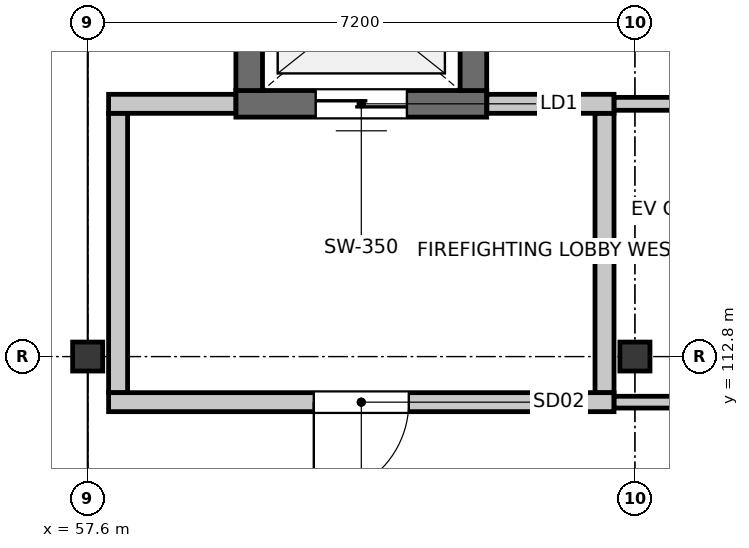
"""IFC4 building model, lengths in metres.
Left out: names, types, materials, properties, quantities, classifications, styles, units other than length and angle.
Written with IfcOpenShell. Run it as: python <this file> out.ifc"""

import sys

from ifc_helpers import new_model, si_unit, direction, frame, frame_2d, origin, origin_2d, place, context, subcontext, project, spatial, rectangle, i_section, extrude, element, fill, save


model = new_model("IFC4")
c1 = context("Model", 3, precision=1e-05, world=origin(), true_north=direction((0.0, 1.0)))
c2 = subcontext(c1, "Body", "Model", "MODEL_VIEW")
j1 = project(units=[si_unit("LENGTHUNIT", "METRE"), si_unit("PLANEANGLEUNIT", "RADIAN")], contexts=[c1])
p1 = place(None, origin())
s1 = spatial("IfcSite", under=j1, at=p1, CompositionType="ELEMENT")
p2 = place(p1, origin())
s2 = spatial("IfcBuilding", under=s1, at=p2, CompositionType="ELEMENT")
p3 = place(p2, frame((0.0, 0.0, 9.3)))
s3 = spatial("IfcBuildingStorey", under=s2, at=p3, CompositionType="ELEMENT", Elevation=9.3)
for number, where, z_axis, x_axis in (
    (1, (57.6, 112.8, 0.0), (0.0, 0.0, 1.0), (1.0, 0.0, 0.0)),
    (2, (64.8, 112.8, 0.0), (0.0, 0.0, 1.0), (1.0, 0.0, 0.0)),
):
    element("IfcColumn", number, at=place(p3, frame(where, z_axis=z_axis, x_axis=x_axis)), inside=s3, PredefinedType="COLUMN", context=c2, shape_type="SweptSolid", body=[
        extrude(i_section(OverallWidth=0.396, OverallDepth=0.381, WebThickness=0.019, FlangeThickness=0.03, FilletRadius=0.015, at=origin_2d()), origin(), (0.0, 0.0, 1.0), 3.9),
    ])
p4 = place(p3, frame((62.85, 116.125, 0.0), z_axis=(0.0, 0.0, 1.0), x_axis=(-1.0, 0.0, 0.0)))
e3 = element("IfcWall", 3, at=p4, inside=s3, PredefinedType="SHEAR", context=c2, shape_type="SweptSolid", body=[
    extrude(rectangle(XDim=3.3, YDim=0.35, at=frame_2d((1.65, 0.0))), origin(), (0.0, 0.0, 1.0), 3.69),
])
p5 = place(p4, frame((1.05, 0.0, 0.0)))
e4 = element("IfcOpeningElement", 4, at=p5, cuts=e3, PredefinedType="OPENING", context=c2, shape_type="SweptSolid", body=[
    extrude(rectangle(XDim=1.2, YDim=2.2, at=frame_2d((0.6, 1.1))), frame((0.0, 0.185, 0.0), z_axis=(0.0, -1.0, 0.0), x_axis=(1.0, 0.0, 0.0)), (0.0, 0.0, 1.0), 0.37),
])
for number, where, z_axis, x_axis in (
    (5, (59.725, 116.3, 0.0), (0.0, 0.0, 1.0), (0.0, 1.0, 0.0)),
    (6, (62.675, 118.5, 0.0), (0.0, 0.0, 1.0), (0.0, -1.0, 0.0)),
):
    element("IfcWall", number, at=place(p3, frame(where, z_axis=z_axis, x_axis=x_axis)), inside=s3, PredefinedType="SHEAR", context=c2, shape_type="SweptSolid", body=[
        extrude(rectangle(XDim=2.2, YDim=0.35, at=frame_2d((1.1, 0.0))), origin(), (0.0, 0.0, 1.0), 3.69),
    ])
p6 = place(p3, frame((64.525, 112.2, 0.0), z_axis=(0.0, 0.0, 1.0), x_axis=(-1.0, 0.0, 0.0)))
e7 = element("IfcWall", 7, at=p6, inside=s3, PredefinedType="PARTITIONING", context=c2, shape_type="SweptSolid", body=[
    extrude(rectangle(XDim=6.65, YDim=0.25, at=frame_2d((3.325, 0.0))), origin(), (0.0, 0.0, 1.0), 3.058),
])
p7 = place(p6, frame((2.7, 0.0, 0.0)))
e8 = element("IfcOpeningElement", 8, at=p7, cuts=e7, PredefinedType="OPENING", context=c2, shape_type="SweptSolid", body=[
    extrude(rectangle(XDim=1.25, YDim=2.2, at=frame_2d((0.625, 1.1))), frame((0.0, 0.135, 0.0), z_axis=(0.0, -1.0, 0.0), x_axis=(1.0, 0.0, 0.0)), (0.0, 0.0, 1.0), 0.27),
])
p8 = place(p3, frame((57.875, 116.125, 0.0), z_axis=(0.0, 0.0, 1.0), x_axis=(1.0, 0.0, 0.0)))
e9 = element("IfcWall", 9, at=p8, inside=s3, PredefinedType="PARTITIONING", context=c2, shape_type="SweptSolid", body=[
    extrude(rectangle(XDim=1.673, YDim=0.25, at=frame_2d((0.836, 0.0))), origin(), (0.0, 0.0, 1.0), 3.058),
])
p9 = place(p3, frame((62.852, 116.125, 0.0), z_axis=(0.0, 0.0, 1.0), x_axis=(1.0, 0.0, 0.0)))
e10 = element("IfcWall", 10, at=p9, inside=s3, PredefinedType="PARTITIONING", context=c2, shape_type="SweptSolid", body=[
    extrude(rectangle(XDim=1.673, YDim=0.25, at=frame_2d((0.836, 0.0))), origin(), (0.0, 0.0, 1.0), 3.058),
])
for number, where, z_axis, x_axis in (
    (11, (58.0, 112.327, 0.0), (0.0, 0.0, 1.0), (0.0, 1.0, 0.0)),
    (12, (64.4, 115.998, 0.0), (0.0, 0.0, 1.0), (0.0, -1.0, 0.0)),
):
    element("IfcWall", number, at=place(p3, frame(where, z_axis=z_axis, x_axis=x_axis)), inside=s3, PredefinedType="PARTITIONING", context=c2, shape_type="SweptSolid", body=[
        extrude(rectangle(XDim=3.671, YDim=0.25, at=frame_2d((1.835, 0.0))), origin(), (0.0, 0.0, 1.0), 3.058),
    ])
p10 = place(p3, frame((75.68, 112.2, 0.0), z_axis=(0.0, 0.0, 1.0), x_axis=(-1.0, 0.0, 0.0)))
e13 = element("IfcWall", 13, at=p10, inside=s3, PredefinedType="PARTITIONING", context=c2, shape_type="SweptSolid", body=[
    extrude(rectangle(XDim=11.153, YDim=0.155, at=frame_2d((5.576, 0.0))), origin(), (0.0, 0.0, 1.0), 3.058),
])
p11 = place(p10, frame((4.852, 0.0, 0.0)))
e14 = element("IfcOpeningElement", 14, at=p11, cuts=e13, PredefinedType="OPENING", context=c2, shape_type="SweptSolid", body=[
    extrude(rectangle(XDim=1.45, YDim=2.34, at=frame_2d((0.725, 1.17))), frame((0.0, 0.087, 0.0), z_axis=(0.0, -1.0, 0.0), x_axis=(1.0, 0.0, 0.0)), (0.0, 0.0, 1.0), 0.175),
])
p12 = place(p3, frame((64.527, 116.125, 0.0), z_axis=(0.0, 0.0, 1.0), x_axis=(1.0, 0.0, 0.0)))
e15 = element("IfcWall", 15, at=p12, inside=s3, PredefinedType="PARTITIONING", context=c2, shape_type="SweptSolid", body=[
    extrude(rectangle(XDim=11.153, YDim=0.17, at=frame_2d((5.576, 0.0))), origin(), (0.0, 0.0, 1.0), 3.058),
])
p13 = place(p5, origin())
e16 = element("IfcDoor", 16, at=p13, inside=s3, OperationType="DOUBLE_DOOR_SLIDING", PredefinedType="DOOR", context=c2, shape_type="SweptSolid", body=[
    extrude(rectangle(XDim=1.2, YDim=2.2, at=frame_2d((0.6, 1.1))), frame((0.0, 0.025, 0.0), z_axis=(0.0, -1.0, 0.0), x_axis=(1.0, 0.0, 0.0)), (0.0, 0.0, 1.0), 0.05),
])
fill(e4, e16)
p14 = place(p7, origin())
e17 = element("IfcDoor", 17, at=p14, inside=s3, OperationType="SINGLE_SWING_RIGHT", PredefinedType="DOOR", context=c2, shape_type="SweptSolid", body=[
    extrude(rectangle(XDim=1.25, YDim=2.2, at=frame_2d((0.625, 1.1))), frame((0.0, 0.025, 0.0), z_axis=(0.0, -1.0, 0.0), x_axis=(1.0, 0.0, 0.0)), (0.0, 0.0, 1.0), 0.05),
])
fill(e8, e17)
save(model, sys.argv[1])
